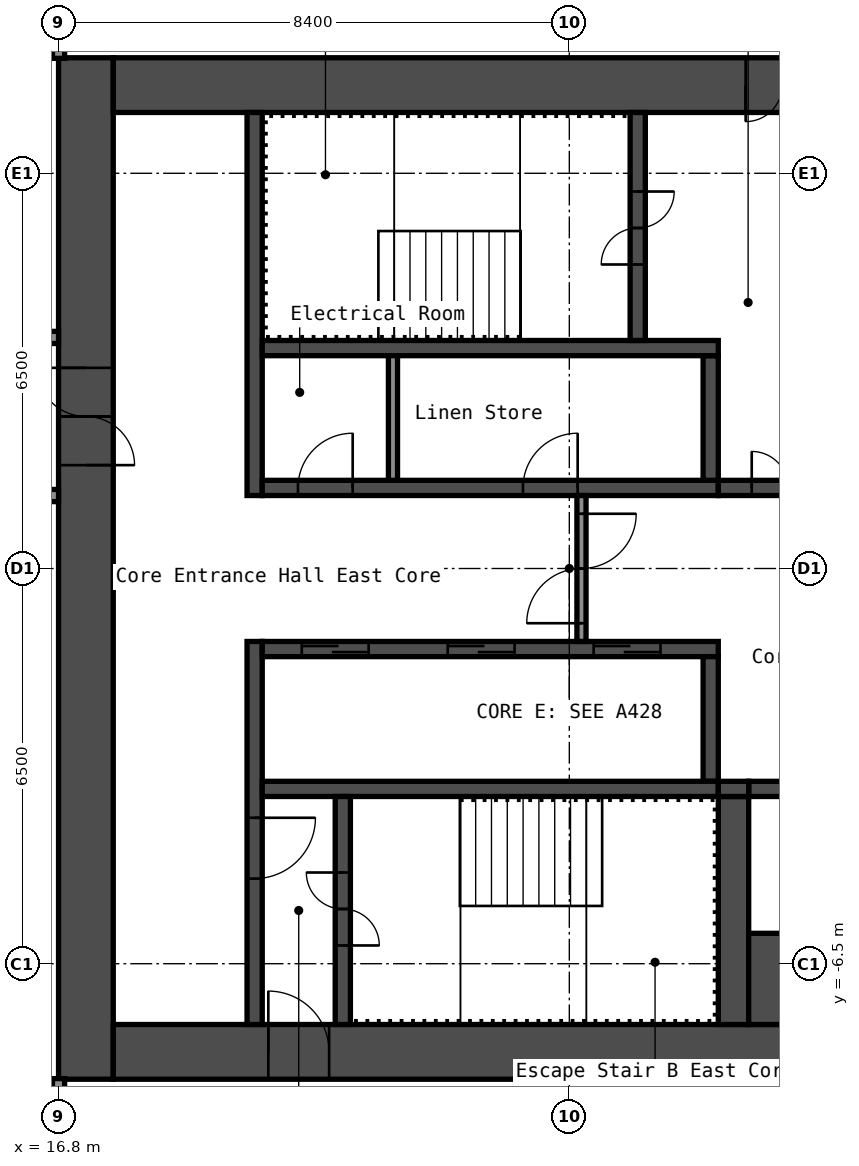
"""IFC4 building model, lengths in metres.
Left out: names, types, materials, properties, quantities, classifications, styles, units other than length and angle.
Written with IfcOpenShell. Run it as: python <this file> out.ifc"""

import sys

from ifc_helpers import new_model, si_unit, direction, frame, frame_2d, origin, place, context, subcontext, project, spatial, rectangle, extrude, element, fill, save


model = new_model("IFC4")
c1 = context("Model", 3, precision=1e-05, world=origin(), true_north=direction((0.0, 1.0)))
c2 = subcontext(c1, "Body", "Model", "MODEL_VIEW")
j1 = project(units=[si_unit("LENGTHUNIT", "METRE"), si_unit("PLANEANGLEUNIT", "RADIAN")], contexts=[c1])
p1 = place(None, origin())
s1 = spatial("IfcSite", under=j1, at=p1, CompositionType="ELEMENT")
p2 = place(p1, origin())
s2 = spatial("IfcBuilding", under=s1, at=p2, CompositionType="ELEMENT")
p3 = place(p2, frame((0.0, 0.0, 186.6)))
s3 = spatial("IfcBuildingStorey", under=s2, at=p3, CompositionType="ELEMENT", Elevation=186.6)
p4 = place(p3, frame((17.25, -8.4, 0.0), z_axis=(0.0, 0.0, 1.0), x_axis=(0.0, 1.0, 0.0)))
e1 = element("IfcWall", 1, at=p4, inside=s3, PredefinedType="SHEAR", context=c2, shape_type="SweptSolid", body=[
    extrude(rectangle(XDim=16.8, YDim=0.9, at=frame_2d((8.4, 0.0))), origin(), (0.0, 0.0, 1.0), 2.75),
])
p5 = place(p4, frame((10.1, 0.0, 0.0)))
e2 = element("IfcOpeningElement", 2, at=p5, cuts=e1, PredefinedType="OPENING", context=c2, shape_type="SweptSolid", body=[
    extrude(rectangle(XDim=1.6, YDim=2.1, at=frame_2d((0.8, 1.05))), frame((0.0, 0.46, 0.0), z_axis=(0.0, -1.0, 0.0), x_axis=(1.0, 0.0, 0.0)), (0.0, 0.0, 1.0), 0.92),
])
p6 = place(p3, frame((17.7, 7.95, 0.0), z_axis=(0.0, 0.0, 1.0), x_axis=(1.0, 0.0, 0.0)))
e3 = element("IfcWall", 3, at=p6, inside=s3, PredefinedType="SHEAR", context=c2, shape_type="SweptSolid", body=[
    extrude(rectangle(XDim=15.0, YDim=0.9, at=frame_2d((7.5, 0.0))), origin(), (0.0, 0.0, 1.0), 2.75),
])
p7 = place(p6, frame((10.4, 0.0, 0.0)))
e4 = element("IfcOpeningElement", 4, at=p7, cuts=e3, PredefinedType="OPENING", context=c2, shape_type="SweptSolid", body=[
    extrude(rectangle(XDim=1.2, YDim=2.1, at=frame_2d((0.6, 1.05))), frame((0.0, 0.46, 0.0), z_axis=(0.0, -1.0, 0.0), x_axis=(1.0, 0.0, 0.0)), (0.0, 0.0, 1.0), 0.92),
])
p8 = place(p6, frame((13.35, 0.0, 0.0)))
e5 = element("IfcOpeningElement", 5, at=p8, cuts=e3, PredefinedType="OPENING", context=c2, shape_type="SweptSolid", body=[
    extrude(rectangle(XDim=0.9, YDim=2.1, at=frame_2d((0.45, 1.05))), frame((0.0, 0.46, 0.0), z_axis=(0.0, -1.0, 0.0), x_axis=(1.0, 0.0, 0.0)), (0.0, 0.0, 1.0), 0.92),
])
p9 = place(p3, frame((17.7, -7.95, 0.0), z_axis=(0.0, 0.0, 1.0), x_axis=(1.0, 0.0, 0.0)))
e6 = element("IfcWall", 6, at=p9, inside=s3, PredefinedType="SHEAR", context=c2, shape_type="SweptSolid", body=[
    extrude(rectangle(XDim=15.0, YDim=0.9, at=frame_2d((7.5, 0.0))), origin(), (0.0, 0.0, 1.0), 2.75),
])
p10 = place(p9, frame((2.55, 0.0, 0.0)))
e7 = element("IfcOpeningElement", 7, at=p10, cuts=e6, PredefinedType="OPENING", context=c2, shape_type="SweptSolid", body=[
    extrude(rectangle(XDim=1.0, YDim=2.1, at=frame_2d((0.5, 1.05))), frame((0.0, 0.46, 0.0), z_axis=(0.0, -1.0, 0.0), x_axis=(1.0, 0.0, 0.0)), (0.0, 0.0, 1.0), 0.92),
])
p11 = place(p3, frame((20.025, 1.2, 0.0), z_axis=(0.0, 0.0, 1.0), x_axis=(0.0, 1.0, 0.0)))
e8 = element("IfcWall", 8, at=p11, inside=s3, PredefinedType="SHEAR", context=c2, shape_type="SweptSolid", body=[
    extrude(rectangle(XDim=6.3, YDim=0.25, at=frame_2d((3.15, 0.0))), origin(), (0.0, 0.0, 1.0), 2.75),
])
p12 = place(p3, frame((20.025, -7.5, 0.0), z_axis=(0.0, 0.0, 1.0), x_axis=(0.0, 1.0, 0.0)))
e9 = element("IfcWall", 9, at=p12, inside=s3, PredefinedType="SHEAR", context=c2, shape_type="SweptSolid", body=[
    extrude(rectangle(XDim=6.3, YDim=0.25, at=frame_2d((3.15, 0.0))), origin(), (0.0, 0.0, 1.0), 2.75),
])
p13 = place(p12, frame((2.4, 0.0, 0.0)))
e10 = element("IfcOpeningElement", 10, at=p13, cuts=e9, PredefinedType="OPENING", context=c2, shape_type="SweptSolid", body=[
    extrude(rectangle(XDim=1.0, YDim=2.1, at=frame_2d((0.5, 1.05))), frame((0.0, 0.135, 0.0), z_axis=(0.0, -1.0, 0.0), x_axis=(1.0, 0.0, 0.0)), (0.0, 0.0, 1.0), 0.27),
])
p14 = place(p3, frame((20.15, 1.325, 0.0), z_axis=(0.0, 0.0, 1.0), x_axis=(1.0, 0.0, 0.0)))
e11 = element("IfcWall", 11, at=p14, inside=s3, PredefinedType="SHEAR", context=c2, shape_type="SweptSolid", body=[
    extrude(rectangle(XDim=7.5, YDim=0.25, at=frame_2d((3.75, 0.0))), origin(), (0.0, 0.0, 1.0), 2.75),
])
p15 = place(p14, frame((0.587, 0.0, 0.0)))
e12 = element("IfcOpeningElement", 12, at=p15, cuts=e11, PredefinedType="OPENING", context=c2, shape_type="SweptSolid", body=[
    extrude(rectangle(XDim=0.9, YDim=2.1, at=frame_2d((0.45, 1.05))), frame((0.0, 0.135, 0.0), z_axis=(0.0, -1.0, 0.0), x_axis=(1.0, 0.0, 0.0)), (0.0, 0.0, 1.0), 0.27),
])
p16 = place(p14, frame((4.288, 0.0, 0.0)))
e13 = element("IfcOpeningElement", 13, at=p16, cuts=e11, PredefinedType="OPENING", context=c2, shape_type="SweptSolid", body=[
    extrude(rectangle(XDim=0.9, YDim=2.1, at=frame_2d((0.45, 1.05))), frame((0.0, 0.135, 0.0), z_axis=(0.0, -1.0, 0.0), x_axis=(1.0, 0.0, 0.0)), (0.0, 0.0, 1.0), 0.27),
])
p17 = place(p3, frame((27.525, 1.45, 0.0), z_axis=(0.0, 0.0, 1.0), x_axis=(0.0, 1.0, 0.0)))
e14 = element("IfcWall", 14, at=p17, inside=s3, PredefinedType="SHEAR", context=c2, shape_type="SweptSolid", body=[
    extrude(rectangle(XDim=2.05, YDim=0.25, at=frame_2d((1.025, 0.0))), origin(), (0.0, 0.0, 1.0), 2.75),
])
p18 = place(p3, frame((20.15, 3.625, 0.0), z_axis=(0.0, 0.0, 1.0), x_axis=(1.0, 0.0, 0.0)))
e15 = element("IfcWall", 15, at=p18, inside=s3, PredefinedType="SHEAR", context=c2, shape_type="SweptSolid", body=[
    extrude(rectangle(XDim=7.5, YDim=0.25, at=frame_2d((3.75, 0.0))), origin(), (0.0, 0.0, 1.0), 2.75),
])
p19 = place(p3, frame((26.325, 3.75, 0.0), z_axis=(0.0, 0.0, 1.0), x_axis=(0.0, 1.0, 0.0)))
e16 = element("IfcWall", 16, at=p19, inside=s3, PredefinedType="SHEAR", context=c2, shape_type="SweptSolid", body=[
    extrude(rectangle(XDim=3.75, YDim=0.25, at=frame_2d((1.875, 0.0))), origin(), (0.0, 0.0, 1.0), 2.75),
])
p20 = place(p19, frame((1.25, 0.0, 0.0)))
e17 = element("IfcOpeningElement", 17, at=p20, cuts=e16, PredefinedType="OPENING", context=c2, shape_type="SweptSolid", body=[
    extrude(rectangle(XDim=1.2, YDim=2.1, at=frame_2d((0.6, 1.05))), frame((0.0, 0.135, 0.0), z_axis=(0.0, -1.0, 0.0), x_axis=(1.0, 0.0, 0.0)), (0.0, 0.0, 1.0), 0.27),
])
p21 = place(p3, frame((27.65, 1.325, 0.0), z_axis=(0.0, 0.0, 1.0), x_axis=(1.0, 0.0, 0.0)))
e18 = element("IfcWall", 18, at=p21, inside=s3, PredefinedType="SHEAR", context=c2, shape_type="SweptSolid", body=[
    extrude(rectangle(XDim=5.05, YDim=0.25, at=frame_2d((2.525, 0.0))), origin(), (0.0, 0.0, 1.0), 2.75),
])
p22 = place(p21, frame((0.55, 0.0, 0.0)))
e19 = element("IfcOpeningElement", 19, at=p22, cuts=e18, PredefinedType="OPENING", context=c2, shape_type="SweptSolid", body=[
    extrude(rectangle(XDim=1.2, YDim=2.1, at=frame_2d((0.6, 1.05))), frame((0.0, 0.135, 0.0), z_axis=(0.0, -1.0, 0.0), x_axis=(1.0, 0.0, 0.0)), (0.0, 0.0, 1.0), 0.27),
])
p23 = place(p3, frame((20.15, -1.325, 0.0), z_axis=(0.0, 0.0, 1.0), x_axis=(1.0, 0.0, 0.0)))
e20 = element("IfcWall", 20, at=p23, inside=s3, PredefinedType="SHEAR", context=c2, shape_type="SweptSolid", body=[
    extrude(rectangle(XDim=7.5, YDim=0.25, at=frame_2d((3.75, 0.0))), origin(), (0.0, 0.0, 1.0), 2.75),
])
p24 = place(p23, frame((0.65, 0.0, 0.0)))
e21 = element("IfcOpeningElement", 21, at=p24, cuts=e20, PredefinedType="OPENING", context=c2, shape_type="SweptSolid", body=[
    extrude(rectangle(XDim=1.1, YDim=2.1, at=frame_2d((0.55, 1.05))), frame((0.0, 0.135, 0.0), z_axis=(0.0, -1.0, 0.0), x_axis=(1.0, 0.0, 0.0)), (0.0, 0.0, 1.0), 0.27),
])
p25 = place(p23, frame((3.05, 0.0, 0.0)))
e22 = element("IfcOpeningElement", 22, at=p25, cuts=e20, PredefinedType="OPENING", context=c2, shape_type="SweptSolid", body=[
    extrude(rectangle(XDim=1.1, YDim=2.1, at=frame_2d((0.55, 1.05))), frame((0.0, 0.135, 0.0), z_axis=(0.0, -1.0, 0.0), x_axis=(1.0, 0.0, 0.0)), (0.0, 0.0, 1.0), 0.27),
])
p26 = place(p23, frame((5.45, 0.0, 0.0)))
e23 = element("IfcOpeningElement", 23, at=p26, cuts=e20, PredefinedType="OPENING", context=c2, shape_type="SweptSolid", body=[
    extrude(rectangle(XDim=1.1, YDim=2.1, at=frame_2d((0.55, 1.05))), frame((0.0, 0.135, 0.0), z_axis=(0.0, -1.0, 0.0), x_axis=(1.0, 0.0, 0.0)), (0.0, 0.0, 1.0), 0.27),
])
p27 = place(p3, frame((27.525, -3.5, 0.0), z_axis=(0.0, 0.0, 1.0), x_axis=(0.0, 1.0, 0.0)))
e24 = element("IfcWall", 24, at=p27, inside=s3, PredefinedType="SHEAR", context=c2, shape_type="SweptSolid", body=[
    extrude(rectangle(XDim=2.05, YDim=0.25, at=frame_2d((1.025, 0.0))), origin(), (0.0, 0.0, 1.0), 2.75),
])
p28 = place(p3, frame((20.15, -3.625, 0.0), z_axis=(0.0, 0.0, 1.0), x_axis=(1.0, 0.0, 0.0)))
e25 = element("IfcWall", 25, at=p28, inside=s3, PredefinedType="SHEAR", context=c2, shape_type="SweptSolid", body=[
    extrude(rectangle(XDim=7.5, YDim=0.25, at=frame_2d((3.75, 0.0))), origin(), (0.0, 0.0, 1.0), 2.75),
])
p29 = place(p3, frame((21.475, -7.5, 0.0), z_axis=(0.0, 0.0, 1.0), x_axis=(0.0, 1.0, 0.0)))
e26 = element("IfcWall", 26, at=p29, inside=s3, PredefinedType="SHEAR", context=c2, shape_type="SweptSolid", body=[
    extrude(rectangle(XDim=3.75, YDim=0.25, at=frame_2d((1.875, 0.0))), origin(), (0.0, 0.0, 1.0), 2.75),
])
p30 = place(p29, frame((1.3, 0.0, 0.0)))
e27 = element("IfcOpeningElement", 27, at=p30, cuts=e26, PredefinedType="OPENING", context=c2, shape_type="SweptSolid", body=[
    extrude(rectangle(XDim=1.2, YDim=2.1, at=frame_2d((0.6, 1.05))), frame((0.0, 0.135, 0.0), z_axis=(0.0, -1.0, 0.0), x_axis=(1.0, 0.0, 0.0)), (0.0, 0.0, 1.0), 0.27),
])
p31 = place(p3, frame((27.9, -7.5, 0.0), z_axis=(0.0, 0.0, 1.0), x_axis=(0.0, 1.0, 0.0)))
e28 = element("IfcWall", 28, at=p31, inside=s3, PredefinedType="SHEAR", context=c2, shape_type="SweptSolid", body=[
    extrude(rectangle(XDim=3.75, YDim=0.5, at=frame_2d((1.875, 0.0))), origin(), (0.0, 0.0, 1.0), 2.75),
])
p32 = place(p3, frame((28.15, -3.625, 0.0), z_axis=(0.0, 0.0, 1.0), x_axis=(1.0, 0.0, 0.0)))
e29 = element("IfcWall", 29, at=p32, inside=s3, PredefinedType="SHEAR", context=c2, shape_type="SweptSolid", body=[
    extrude(rectangle(XDim=4.55, YDim=0.25, at=frame_2d((2.275, 0.0))), origin(), (0.0, 0.0, 1.0), 2.75),
])
p33 = place(p3, frame((28.15, -6.75, 0.0), z_axis=(0.0, 0.0, 1.0), x_axis=(1.0, 0.0, 0.0)))
e30 = element("IfcWall", 30, at=p33, inside=s3, PredefinedType="SHEAR", context=c2, shape_type="SweptSolid", body=[
    extrude(rectangle(XDim=4.55, YDim=1.5, at=frame_2d((2.275, 0.0))), origin(), (0.0, 0.0, 1.0), 2.75),
])
p34 = place(p3, frame((27.65, -3.625, 0.0), z_axis=(0.0, 0.0, 1.0), x_axis=(1.0, 0.0, 0.0)))
e31 = element("IfcWall", 31, at=p34, inside=s3, PredefinedType="SHEAR", context=c2, shape_type="SweptSolid", body=[
    extrude(rectangle(XDim=0.5, YDim=0.25, at=frame_2d((0.25, 0.0))), origin(), (0.0, 0.0, 1.0), 2.75),
])
p35 = place(p3, frame((25.4, -1.2, 0.0), z_axis=(0.0, 0.0, 1.0), x_axis=(0.0, 1.0, 0.0)))
e32 = element("IfcWall", 32, at=p35, inside=s3, PredefinedType="PARTITIONING", context=c2, shape_type="SweptSolid", body=[
    extrude(rectangle(XDim=2.4, YDim=0.15, at=frame_2d((1.2, 0.0))), origin(), (0.0, 0.0, 1.0), 2.75),
])
p36 = place(p35, frame((0.3, 0.0, 0.0)))
e33 = element("IfcOpeningElement", 33, at=p36, cuts=e32, PredefinedType="OPENING", context=c2, shape_type="SweptSolid", body=[
    extrude(rectangle(XDim=1.8, YDim=2.1, at=frame_2d((0.9, 1.05))), frame((0.0, 0.085, 0.0), z_axis=(0.0, -1.0, 0.0), x_axis=(1.0, 0.0, 0.0)), (0.0, 0.0, 1.0), 0.17),
])
p37 = place(p3, frame((22.3, 1.45, 0.0), z_axis=(0.0, 0.0, 1.0), x_axis=(0.0, 1.0, 0.0)))
e34 = element("IfcWall", 34, at=p37, inside=s3, PredefinedType="PARTITIONING", context=c2, shape_type="SweptSolid", body=[
    extrude(rectangle(XDim=2.05, YDim=0.15, at=frame_2d((1.025, 0.0))), origin(), (0.0, 0.0, 1.0), 2.75),
])
p38 = place(p3, frame((-16.8, 1.2, 0.0), z_axis=(0.0, 0.0, 1.0), x_axis=(1.0, 0.0, 0.0)))
e35 = element("IfcWall", 35, at=p38, inside=s3, PredefinedType="PARTITIONING", context=c2, shape_type="SweptSolid", body=[
    extrude(rectangle(XDim=33.6, YDim=0.2, at=frame_2d((16.8, 0.0))), origin(), (0.0, 0.0, 1.0), 2.75),
])
p39 = place(p38, frame((5.5, 0.0, 0.0)))
e36 = element("IfcOpeningElement", 36, at=p39, cuts=e35, PredefinedType="OPENING", context=c2, shape_type="SweptSolid", body=[
    extrude(rectangle(XDim=1.0, YDim=2.1, at=frame_2d((0.5, 1.05))), frame((0.0, 0.11, 0.0), z_axis=(0.0, -1.0, 0.0), x_axis=(1.0, 0.0, 0.0)), (0.0, 0.0, 1.0), 0.22),
])
p40 = place(p38, frame((12.1, 0.0, 0.0)))
e37 = element("IfcOpeningElement", 37, at=p40, cuts=e35, PredefinedType="OPENING", context=c2, shape_type="SweptSolid", body=[
    extrude(rectangle(XDim=1.0, YDim=2.1, at=frame_2d((0.5, 1.05))), frame((0.0, 0.11, 0.0), z_axis=(0.0, -1.0, 0.0), x_axis=(1.0, 0.0, 0.0)), (0.0, 0.0, 1.0), 0.22),
])
p41 = place(p38, frame((22.2, 0.0, 0.0)))
e38 = element("IfcOpeningElement", 38, at=p41, cuts=e35, PredefinedType="OPENING", context=c2, shape_type="SweptSolid", body=[
    extrude(rectangle(XDim=1.0, YDim=2.1, at=frame_2d((0.5, 1.05))), frame((0.0, 0.11, 0.0), z_axis=(0.0, -1.0, 0.0), x_axis=(1.0, 0.0, 0.0)), (0.0, 0.0, 1.0), 0.22),
])
p42 = place(p38, frame((30.6, 0.0, 0.0)))
e39 = element("IfcOpeningElement", 39, at=p42, cuts=e35, PredefinedType="OPENING", context=c2, shape_type="SweptSolid", body=[
    extrude(rectangle(XDim=1.0, YDim=2.1, at=frame_2d((0.5, 1.05))), frame((0.0, 0.11, 0.0), z_axis=(0.0, -1.0, 0.0), x_axis=(1.0, 0.0, 0.0)), (0.0, 0.0, 1.0), 0.22),
])
p43 = place(p3, frame((-16.8, 3.8, 0.0), z_axis=(0.0, 0.0, 1.0), x_axis=(1.0, 0.0, 0.0)))
e40 = element("IfcWall", 40, at=p43, inside=s3, PredefinedType="PARTITIONING", context=c2, shape_type="SweptSolid", body=[
    extrude(rectangle(XDim=33.6, YDim=0.2, at=frame_2d((16.8, 0.0))), origin(), (0.0, 0.0, 1.0), 2.75),
])
p44 = place(p43, frame((2.0, 0.0, 0.0)))
e41 = element("IfcOpeningElement", 41, at=p44, cuts=e40, PredefinedType="OPENING", context=c2, shape_type="SweptSolid", body=[
    extrude(rectangle(XDim=1.0, YDim=2.1, at=frame_2d((0.5, 1.05))), frame((0.0, 0.11, 0.0), z_axis=(0.0, -1.0, 0.0), x_axis=(1.0, 0.0, 0.0)), (0.0, 0.0, 1.0), 0.22),
])
p45 = place(p43, frame((10.555, 0.0, 0.0)))
e42 = element("IfcOpeningElement", 42, at=p45, cuts=e40, PredefinedType="OPENING", context=c2, shape_type="SweptSolid", body=[
    extrude(rectangle(XDim=0.9, YDim=2.1, at=frame_2d((0.45, 1.05))), frame((0.0, 0.11, 0.0), z_axis=(0.0, -1.0, 0.0), x_axis=(1.0, 0.0, 0.0)), (0.0, 0.0, 1.0), 0.22),
])
p46 = place(p43, frame((14.755, 0.0, 0.0)))
e43 = element("IfcOpeningElement", 43, at=p46, cuts=e40, PredefinedType="OPENING", context=c2, shape_type="SweptSolid", body=[
    extrude(rectangle(XDim=0.9, YDim=2.1, at=frame_2d((0.45, 1.05))), frame((0.0, 0.11, 0.0), z_axis=(0.0, -1.0, 0.0), x_axis=(1.0, 0.0, 0.0)), (0.0, 0.0, 1.0), 0.22),
])
p47 = place(p43, frame((18.785, 0.0, 0.0)))
e44 = element("IfcOpeningElement", 44, at=p47, cuts=e40, PredefinedType="OPENING", context=c2, shape_type="SweptSolid", body=[
    extrude(rectangle(XDim=0.9, YDim=2.1, at=frame_2d((0.45, 1.05))), frame((0.0, 0.11, 0.0), z_axis=(0.0, -1.0, 0.0), x_axis=(1.0, 0.0, 0.0)), (0.0, 0.0, 1.0), 0.22),
])
p48 = place(p43, frame((22.985, 0.0, 0.0)))
e45 = element("IfcOpeningElement", 45, at=p48, cuts=e40, PredefinedType="OPENING", context=c2, shape_type="SweptSolid", body=[
    extrude(rectangle(XDim=0.9, YDim=2.1, at=frame_2d((0.45, 1.05))), frame((0.0, 0.11, 0.0), z_axis=(0.0, -1.0, 0.0), x_axis=(1.0, 0.0, 0.0)), (0.0, 0.0, 1.0), 0.22),
])
p49 = place(p43, frame((30.6, 0.0, 0.0)))
e46 = element("IfcOpeningElement", 46, at=p49, cuts=e40, PredefinedType="OPENING", context=c2, shape_type="SweptSolid", body=[
    extrude(rectangle(XDim=1.0, YDim=2.1, at=frame_2d((0.5, 1.05))), frame((0.0, 0.11, 0.0), z_axis=(0.0, -1.0, 0.0), x_axis=(1.0, 0.0, 0.0)), (0.0, 0.0, 1.0), 0.22),
])
p50 = place(p3, frame((16.8, -15.55, 0.0), z_axis=(0.0, 0.0, 1.0), x_axis=(0.0, 1.0, 0.0)))
e47 = element("IfcWall", 47, at=p50, inside=s3, PredefinedType="PARTITIONING", context=c2, shape_type="SweptSolid", body=[
    extrude(rectangle(XDim=7.16, YDim=0.2, at=frame_2d((3.58, 0.0))), origin(), (0.0, 0.0, 1.0), 2.75),
])
p51 = place(p3, frame((16.8, 8.39, 0.0), z_axis=(0.0, 0.0, 1.0), x_axis=(0.0, 1.0, 0.0)))
e48 = element("IfcWall", 48, at=p51, inside=s3, PredefinedType="PARTITIONING", context=c2, shape_type="SweptSolid", body=[
    extrude(rectangle(XDim=12.16, YDim=0.2, at=frame_2d((6.08, 0.0))), origin(), (0.0, 0.0, 1.0), 2.75),
])
p52 = place(p5, origin())
e49 = element("IfcDoor", 49, at=p52, inside=s3, OperationType="DOUBLE_DOOR_SINGLE_SWING", PredefinedType="DOOR", context=c2, shape_type="SweptSolid", body=[
    extrude(rectangle(XDim=1.6, YDim=2.1, at=frame_2d((0.8, 1.05))), frame((0.0, 0.025, 0.0), z_axis=(0.0, -1.0, 0.0), x_axis=(1.0, 0.0, 0.0)), (0.0, 0.0, 1.0), 0.05),
])
fill(e2, e49)
p53 = place(p7, origin())
e50 = element("IfcDoor", 50, at=p53, inside=s3, OperationType="DOUBLE_DOOR_SINGLE_SWING", PredefinedType="DOOR", context=c2, shape_type="SweptSolid", body=[
    extrude(rectangle(XDim=1.2, YDim=2.1, at=frame_2d((0.6, 1.05))), frame((0.0, 0.025, 0.0), z_axis=(0.0, -1.0, 0.0), x_axis=(1.0, 0.0, 0.0)), (0.0, 0.0, 1.0), 0.05),
])
fill(e4, e50)
p54 = place(p10, origin())
e51 = element("IfcDoor", 51, at=p54, inside=s3, OperationType="SINGLE_SWING_RIGHT", PredefinedType="DOOR", context=c2, shape_type="SweptSolid", body=[
    extrude(rectangle(XDim=1.0, YDim=2.1, at=frame_2d((0.5, 1.05))), frame((0.0, 0.025, 0.0), z_axis=(0.0, -1.0, 0.0), x_axis=(1.0, 0.0, 0.0)), (0.0, 0.0, 1.0), 0.05),
])
fill(e7, e51)
p55 = place(p20, origin())
e52 = element("IfcDoor", 52, at=p55, inside=s3, OperationType="DOUBLE_DOOR_SINGLE_SWING", PredefinedType="DOOR", context=c2, shape_type="SweptSolid", body=[
    extrude(rectangle(XDim=1.2, YDim=2.1, at=frame_2d((0.6, 1.05))), frame((0.0, 0.025, 0.0), z_axis=(0.0, -1.0, 0.0), x_axis=(1.0, 0.0, 0.0)), (0.0, 0.0, 1.0), 0.05),
])
fill(e17, e52)
p56 = place(p30, origin())
e53 = element("IfcDoor", 53, at=p56, inside=s3, OperationType="DOUBLE_DOOR_SINGLE_SWING", PredefinedType="DOOR", context=c2, shape_type="SweptSolid", body=[
    extrude(rectangle(XDim=1.2, YDim=2.1, at=frame_2d((0.6, 1.05))), frame((0.0, 0.025, 0.0), z_axis=(0.0, -1.0, 0.0), x_axis=(1.0, 0.0, 0.0)), (0.0, 0.0, 1.0), 0.05),
])
fill(e27, e53)
p57 = place(p13, origin())
e54 = element("IfcDoor", 54, at=p57, inside=s3, OperationType="SINGLE_SWING_RIGHT", PredefinedType="DOOR", context=c2, shape_type="SweptSolid", body=[
    extrude(rectangle(XDim=1.0, YDim=2.1, at=frame_2d((0.5, 1.05))), frame((0.0, 0.025, 0.0), z_axis=(0.0, -1.0, 0.0), x_axis=(1.0, 0.0, 0.0)), (0.0, 0.0, 1.0), 0.05),
])
fill(e10, e54)
p58 = place(p22, origin())
e55 = element("IfcDoor", 55, at=p58, inside=s3, OperationType="DOUBLE_DOOR_SINGLE_SWING", PredefinedType="DOOR", context=c2, shape_type="SweptSolid", body=[
    extrude(rectangle(XDim=1.2, YDim=2.1, at=frame_2d((0.6, 1.05))), frame((0.0, 0.025, 0.0), z_axis=(0.0, -1.0, 0.0), x_axis=(1.0, 0.0, 0.0)), (0.0, 0.0, 1.0), 0.05),
])
fill(e19, e55)
p59 = place(p36, origin())
e56 = element("IfcDoor", 56, at=p59, inside=s3, OperationType="DOUBLE_DOOR_SINGLE_SWING", PredefinedType="DOOR", context=c2, shape_type="SweptSolid", body=[
    extrude(rectangle(XDim=1.8, YDim=2.1, at=frame_2d((0.9, 1.05))), frame((0.0, 0.025, 0.0), z_axis=(0.0, -1.0, 0.0), x_axis=(1.0, 0.0, 0.0)), (0.0, 0.0, 1.0), 0.05),
])
fill(e33, e56)
p60 = place(p15, origin())
e57 = element("IfcDoor", 57, at=p60, inside=s3, OperationType="SINGLE_SWING_LEFT", PredefinedType="DOOR", context=c2, shape_type="SweptSolid", body=[
    extrude(rectangle(XDim=0.9, YDim=2.1, at=frame_2d((0.45, 1.05))), frame((0.0, 0.025, 0.0), z_axis=(0.0, -1.0, 0.0), x_axis=(1.0, 0.0, 0.0)), (0.0, 0.0, 1.0), 0.05),
])
fill(e12, e57)
p61 = place(p16, origin())
e58 = element("IfcDoor", 58, at=p61, inside=s3, OperationType="SINGLE_SWING_LEFT", PredefinedType="DOOR", context=c2, shape_type="SweptSolid", body=[
    extrude(rectangle(XDim=0.9, YDim=2.1, at=frame_2d((0.45, 1.05))), frame((0.0, 0.025, 0.0), z_axis=(0.0, -1.0, 0.0), x_axis=(1.0, 0.0, 0.0)), (0.0, 0.0, 1.0), 0.05),
])
fill(e13, e58)
p62 = place(p24, origin())
e59 = element("IfcDoor", 59, at=p62, inside=s3, OperationType="DOUBLE_DOOR_SLIDING", PredefinedType="DOOR", context=c2, shape_type="SweptSolid", body=[
    extrude(rectangle(XDim=1.1, YDim=2.1, at=frame_2d((0.55, 1.05))), frame((0.0, 0.025, 0.0), z_axis=(0.0, -1.0, 0.0), x_axis=(1.0, 0.0, 0.0)), (0.0, 0.0, 1.0), 0.05),
])
fill(e21, e59)
p63 = place(p25, origin())
e60 = element("IfcDoor", 60, at=p63, inside=s3, OperationType="DOUBLE_DOOR_SLIDING", PredefinedType="DOOR", context=c2, shape_type="SweptSolid", body=[
    extrude(rectangle(XDim=1.1, YDim=2.1, at=frame_2d((0.55, 1.05))), frame((0.0, 0.025, 0.0), z_axis=(0.0, -1.0, 0.0), x_axis=(1.0, 0.0, 0.0)), (0.0, 0.0, 1.0), 0.05),
])
fill(e22, e60)
p64 = place(p26, origin())
e61 = element("IfcDoor", 61, at=p64, inside=s3, OperationType="DOUBLE_DOOR_SLIDING", PredefinedType="DOOR", context=c2, shape_type="SweptSolid", body=[
    extrude(rectangle(XDim=1.1, YDim=2.1, at=frame_2d((0.55, 1.05))), frame((0.0, 0.025, 0.0), z_axis=(0.0, -1.0, 0.0), x_axis=(1.0, 0.0, 0.0)), (0.0, 0.0, 1.0), 0.05),
])
fill(e23, e61)
save(model, sys.argv[1])
